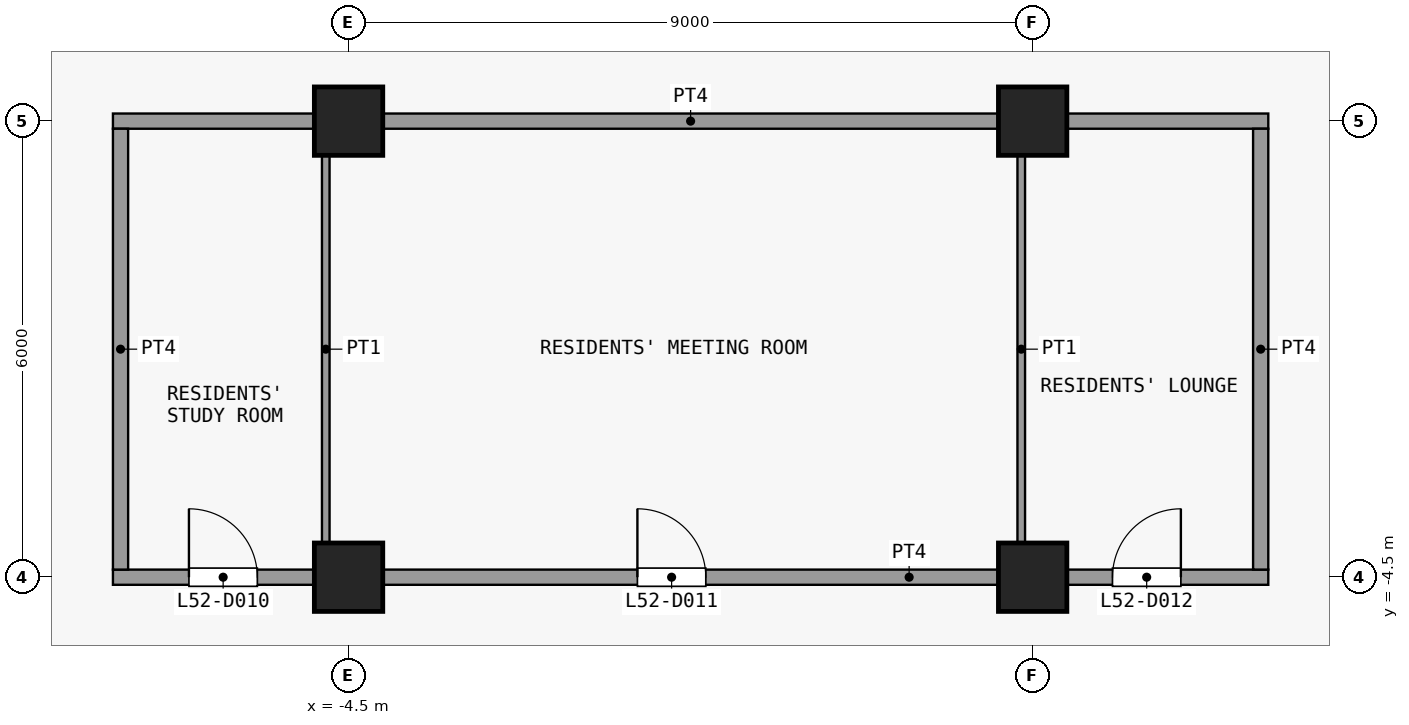
"""IFC4 building model, lengths in metres.
Left out: names, types, materials, properties, quantities, classifications, styles, units other than length and angle.
Written with IfcOpenShell. Run it as: python <this file> out.ifc"""

import sys

from ifc_helpers import new_model, si_unit, direction, frame, frame_2d, origin, origin_2d, place, context, subcontext, project, spatial, rectangle, extrude, element, fill, save


model = new_model("IFC4")
c1 = context("Model", 3, precision=1e-05, world=origin(), true_north=direction((0.0, 1.0)))
c2 = subcontext(c1, "Body", "Model", "MODEL_VIEW")
j1 = project(units=[si_unit("LENGTHUNIT", "METRE"), si_unit("PLANEANGLEUNIT", "RADIAN")], contexts=[c1])
p1 = place(None, origin())
s1 = spatial("IfcSite", under=j1, at=p1, CompositionType="ELEMENT")
p2 = place(p1, origin())
s2 = spatial("IfcBuilding", under=s1, at=p2, CompositionType="ELEMENT")
p3 = place(p2, frame((0.0, 0.0, 208.7)))
s3 = spatial("IfcBuildingStorey", under=s2, at=p3, CompositionType="ELEMENT", Elevation=208.7)
for number, where, z_axis, x_axis in (
    (1, (-4.5, -4.5, 0.0), (0.0, 0.0, 1.0), (1.0, 0.0, 0.0)),
    (2, (-4.5, 1.5, 0.0), (0.0, 0.0, 1.0), (1.0, 0.0, 0.0)),
    (3, (4.5, -4.5, 0.0), (0.0, 0.0, 1.0), (1.0, 0.0, 0.0)),
    (4, (4.5, 1.5, 0.0), (0.0, 0.0, 1.0), (1.0, 0.0, 0.0)),
):
    element("IfcColumn", number, at=place(p3, frame(where, z_axis=z_axis, x_axis=x_axis)), inside=s3, PredefinedType="COLUMN", context=c2, shape_type="SweptSolid", body=[
        extrude(rectangle(XDim=0.9, YDim=0.9, at=origin_2d()), origin(), (0.0, 0.0, 1.0), 3.6),
    ])
p4 = place(p3, frame((-7.6, -4.5, 0.0), z_axis=(0.0, 0.0, 1.0), x_axis=(1.0, 0.0, 0.0)))
e5 = element("IfcWall", 5, at=p4, inside=s3, PredefinedType="PARTITIONING", context=c2, shape_type="SweptSolid", body=[
    extrude(rectangle(XDim=15.2, YDim=0.2, at=frame_2d((7.6, 0.0))), origin(), (0.0, 0.0, 1.0), 3.3),
])
p5 = place(p4, frame((1.0, 0.0, 0.0)))
e6 = element("IfcOpeningElement", 6, at=p5, cuts=e5, PredefinedType="OPENING", context=c2, shape_type="SweptSolid", body=[
    extrude(rectangle(XDim=0.9, YDim=2.1, at=frame_2d((0.45, 1.05))), frame((0.0, 0.11, 0.0), z_axis=(0.0, -1.0, 0.0), x_axis=(1.0, 0.0, 0.0)), (0.0, 0.0, 1.0), 0.22),
])
p6 = place(p4, frame((6.9, 0.0, 0.0)))
e7 = element("IfcOpeningElement", 7, at=p6, cuts=e5, PredefinedType="OPENING", context=c2, shape_type="SweptSolid", body=[
    extrude(rectangle(XDim=0.9, YDim=2.1, at=frame_2d((0.45, 1.05))), frame((0.0, 0.11, 0.0), z_axis=(0.0, -1.0, 0.0), x_axis=(1.0, 0.0, 0.0)), (0.0, 0.0, 1.0), 0.22),
])
p7 = place(p4, frame((13.15, 0.0, 0.0)))
e8 = element("IfcOpeningElement", 8, at=p7, cuts=e5, PredefinedType="OPENING", context=c2, shape_type="SweptSolid", body=[
    extrude(rectangle(XDim=0.9, YDim=2.1, at=frame_2d((0.45, 1.05))), frame((0.0, 0.11, 0.0), z_axis=(0.0, -1.0, 0.0), x_axis=(1.0, 0.0, 0.0)), (0.0, 0.0, 1.0), 0.22),
])
p8 = place(p3, frame((-7.6, 1.5, 0.0), z_axis=(0.0, 0.0, 1.0), x_axis=(1.0, 0.0, 0.0)))
e9 = element("IfcWall", 9, at=p8, inside=s3, PredefinedType="PARTITIONING", context=c2, shape_type="SweptSolid", body=[
    extrude(rectangle(XDim=15.2, YDim=0.2, at=frame_2d((7.6, 0.0))), origin(), (0.0, 0.0, 1.0), 3.3),
])
p9 = place(p3, frame((-7.5, -4.4, 0.0), z_axis=(0.0, 0.0, 1.0), x_axis=(0.0, 1.0, 0.0)))
e10 = element("IfcWall", 10, at=p9, inside=s3, PredefinedType="PARTITIONING", context=c2, shape_type="SweptSolid", body=[
    extrude(rectangle(XDim=5.8, YDim=0.2, at=frame_2d((2.9, 0.0))), origin(), (0.0, 0.0, 1.0), 3.3),
])
for number, where, z_axis, x_axis in (
    (11, (-4.8, -4.4, 0.0), (0.0, 0.0, 1.0), (0.0, 1.0, 0.0)),
    (12, (4.35, -4.4, 0.0), (0.0, 0.0, 1.0), (0.0, 1.0, 0.0)),
):
    element("IfcWall", number, at=place(p3, frame(where, z_axis=z_axis, x_axis=x_axis)), inside=s3, PredefinedType="PARTITIONING", context=c2, shape_type="SweptSolid", body=[
        extrude(rectangle(XDim=5.8, YDim=0.1, at=frame_2d((2.9, 0.0))), origin(), (0.0, 0.0, 1.0), 3.3),
    ])
p10 = place(p3, frame((7.5, -4.4, 0.0), z_axis=(0.0, 0.0, 1.0), x_axis=(0.0, 1.0, 0.0)))
e13 = element("IfcWall", 13, at=p10, inside=s3, PredefinedType="PARTITIONING", context=c2, shape_type="SweptSolid", body=[
    extrude(rectangle(XDim=5.8, YDim=0.2, at=frame_2d((2.9, 0.0))), origin(), (0.0, 0.0, 1.0), 3.3),
])
p11 = place(p5, origin())
e14 = element("IfcDoor", 14, at=p11, inside=s3, OperationType="SINGLE_SWING_RIGHT", PredefinedType="DOOR", context=c2, shape_type="SweptSolid", body=[
    extrude(rectangle(XDim=0.9, YDim=2.1, at=frame_2d((0.45, 1.05))), frame((0.0, 0.025, 0.0), z_axis=(0.0, -1.0, 0.0), x_axis=(1.0, 0.0, 0.0)), (0.0, 0.0, 1.0), 0.05),
])
fill(e6, e14)
p12 = place(p6, origin())
e15 = element("IfcDoor", 15, at=p12, inside=s3, OperationType="SINGLE_SWING_RIGHT", PredefinedType="DOOR", context=c2, shape_type="SweptSolid", body=[
    extrude(rectangle(XDim=0.9, YDim=2.1, at=frame_2d((0.45, 1.05))), frame((0.0, 0.025, 0.0), z_axis=(0.0, -1.0, 0.0), x_axis=(1.0, 0.0, 0.0)), (0.0, 0.0, 1.0), 0.05),
])
fill(e7, e15)
p13 = place(p7, origin())
e16 = element("IfcDoor", 16, at=p13, inside=s3, OperationType="SINGLE_SWING_LEFT", PredefinedType="DOOR", context=c2, shape_type="SweptSolid", body=[
    extrude(rectangle(XDim=0.9, YDim=2.1, at=frame_2d((0.45, 1.05))), frame((0.0, 0.025, 0.0), z_axis=(0.0, -1.0, 0.0), x_axis=(1.0, 0.0, 0.0)), (0.0, 0.0, 1.0), 0.05),
])
fill(e8, e16)
save(model, sys.argv[1])
